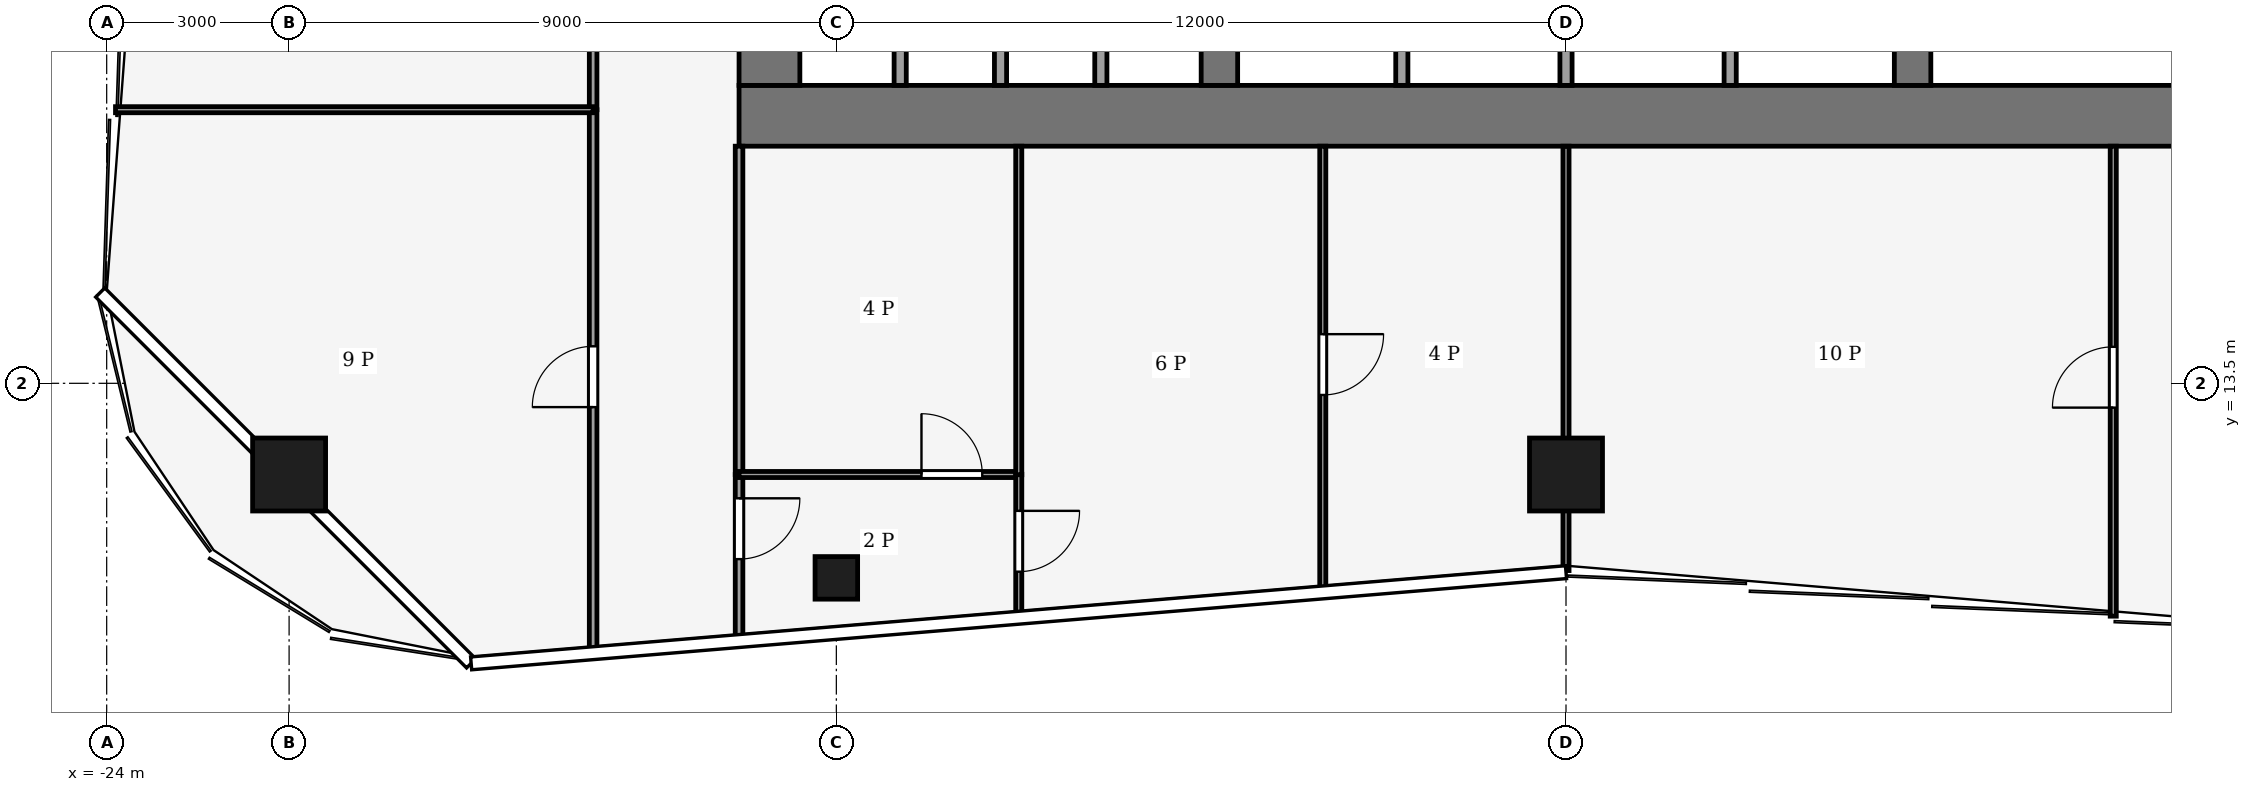
"""IFC4 building model, lengths in metres.
Left out: names, types, materials, properties, quantities, classifications, styles, units other than length and angle.
Written with IfcOpenShell. Run it as: python <this file> out.ifc"""

import sys

from ifc_helpers import new_model, si_unit, direction, frame, frame_2d, origin, origin_2d, place, context, subcontext, project, spatial, rectangle, hollow_rectangle, extrude, element, fill, save


model = new_model("IFC4")
c1 = context("Model", 3, precision=1e-05, world=origin(), true_north=direction((0.0, 1.0)))
c2 = subcontext(c1, "Body", "Model", "MODEL_VIEW")
j1 = project(units=[si_unit("LENGTHUNIT", "METRE"), si_unit("PLANEANGLEUNIT", "RADIAN")], contexts=[c1])
p1 = place(None, origin())
s1 = spatial("IfcSite", under=j1, at=p1, CompositionType="ELEMENT")
p2 = place(p1, origin())
s2 = spatial("IfcBuilding", under=s1, at=p2, CompositionType="ELEMENT")
p3 = place(p2, frame((0.0, 0.0, 146.0)))
s3 = spatial("IfcBuildingStorey", under=s2, at=p3, CompositionType="ELEMENT", Elevation=146.0)
p4 = place(p3, frame((-13.6, 17.9, -0.13), z_axis=(0.0, 0.0, 1.0), x_axis=(1.0, 0.0, 0.0)))
e1 = element("IfcWall", 1, at=p4, inside=s3, PredefinedType="SHEAR", context=c2, shape_type="SweptSolid", body=[
    extrude(rectangle(XDim=27.2, YDim=1.0, at=frame_2d((13.6, 0.0))), origin(), (0.0, 0.0, 1.0), 4.0),
])
p5 = place(p3, frame((-13.1, 18.4, -0.13), z_axis=(0.0, 0.0, 1.0), x_axis=(0.0, 1.0, 0.0)))
e2 = element("IfcWall", 2, at=p5, inside=s3, PredefinedType="SHEAR", context=c2, shape_type="SweptSolid", body=[
    extrude(rectangle(XDim=19.2, YDim=1.0, at=frame_2d((9.6, 0.0))), origin(), (0.0, 0.0, 1.0), 4.0),
])
p6 = place(p5, frame((2.8, 0.0, 0.13)))
e3 = element("IfcOpeningElement", 3, at=p6, cuts=e2, PredefinedType="OPENING", context=c2, shape_type="SweptSolid", body=[
    extrude(rectangle(XDim=2.4, YDim=2.4, at=frame_2d((1.2, 1.2))), frame((0.0, 0.51, 0.0), z_axis=(0.0, -1.0, 0.0), x_axis=(1.0, 0.0, 0.0)), (0.0, 0.0, 1.0), 1.02),
])
p7 = place(p5, frame((13.4, 0.0, 0.13)))
e4 = element("IfcOpeningElement", 4, at=p7, cuts=e2, PredefinedType="OPENING", context=c2, shape_type="SweptSolid", body=[
    extrude(rectangle(XDim=1.4, YDim=2.2, at=frame_2d((0.7, 1.1))), frame((0.0, 0.51, 0.0), z_axis=(0.0, -1.0, 0.0), x_axis=(1.0, 0.0, 0.0)), (0.0, 0.0, 1.0), 1.02),
])
p8 = place(p3, frame((-5.7, 18.4, -0.13), z_axis=(0.0, 0.0, 1.0), x_axis=(0.0, 1.0, 0.0)))
e5 = element("IfcWall", 5, at=p8, inside=s3, PredefinedType="SHEAR", context=c2, shape_type="SweptSolid", body=[
    extrude(rectangle(XDim=19.2, YDim=0.6, at=frame_2d((9.6, 0.0))), origin(), (0.0, 0.0, 1.0), 4.0),
])
p9 = place(p8, frame((8.35, 0.0, 0.13)))
e6 = element("IfcOpeningElement", 6, at=p9, cuts=e5, PredefinedType="OPENING", context=c2, shape_type="SweptSolid", body=[
    extrude(rectangle(XDim=0.9, YDim=2.1, at=frame_2d((0.45, 1.05))), frame((0.0, 0.31, 0.0), z_axis=(0.0, -1.0, 0.0), x_axis=(1.0, 0.0, 0.0)), (0.0, 0.0, 1.0), 0.62),
])
p10 = place(p3, frame((5.7, 18.4, -0.13), z_axis=(0.0, 0.0, 1.0), x_axis=(0.0, 1.0, 0.0)))
e7 = element("IfcWall", 7, at=p10, inside=s3, PredefinedType="SHEAR", context=c2, shape_type="SweptSolid", body=[
    extrude(rectangle(XDim=19.2, YDim=0.6, at=frame_2d((9.6, 0.0))), origin(), (0.0, 0.0, 1.0), 4.0),
])
p11 = place(p10, frame((8.35, 0.0, 0.13)))
e8 = element("IfcOpeningElement", 8, at=p11, cuts=e7, PredefinedType="OPENING", context=c2, shape_type="SweptSolid", body=[
    extrude(rectangle(XDim=0.9, YDim=2.1, at=frame_2d((0.45, 1.05))), frame((0.0, 0.31, 0.0), z_axis=(0.0, -1.0, 0.0), x_axis=(1.0, 0.0, 0.0)), (0.0, 0.0, 1.0), 0.62),
])
p12 = place(p10, frame((13.3, 0.0, 0.13)))
e9 = element("IfcOpeningElement", 9, at=p12, cuts=e7, PredefinedType="OPENING", context=c2, shape_type="SweptSolid", body=[
    extrude(rectangle(XDim=2.4, YDim=2.4, at=frame_2d((1.2, 1.2))), frame((0.0, 0.31, 0.0), z_axis=(0.0, -1.0, 0.0), x_axis=(1.0, 0.0, 0.0)), (0.0, 0.0, 1.0), 0.62),
])
for number, where, z_axis, x_axis in (
    (10, (0.0, 12.0, 0.0), (0.0, 0.0, 1.0), (1.0, 0.0, 0.0)),
    (11, (-21.0, 12.0, 0.0), (0.0, 0.0, 1.0), (1.0, 0.0, 0.0)),
):
    element("IfcColumn", number, at=place(p3, frame(where, z_axis=z_axis, x_axis=x_axis)), inside=s3, PredefinedType="COLUMN", context=c2, shape_type="SweptSolid", body=[
        extrude(hollow_rectangle(XDim=1.2, YDim=1.2, WallThickness=0.07, at=origin_2d()), origin(), (0.0, 0.0, 1.0), 4.0),
    ])
p13 = place(p3, frame((-12.0, 10.3, 0.0), z_axis=(0.0, 0.0, 1.0), x_axis=(1.0, 0.0, 0.0)))
e12 = element("IfcColumn", 12, at=p13, inside=s3, PredefinedType="COLUMN", context=c2, shape_type="SweptSolid", body=[
    extrude(hollow_rectangle(XDim=0.7, YDim=0.7, WallThickness=0.03, at=origin_2d()), origin(), (0.0, 0.0, 1.0), 4.0),
])
for number, where, z_axis, x_axis in (
    (13, (-10.95, 18.4, 0.0), (0.0, 0.0, 1.0), (0.0, 1.0, 0.0)),
    (14, (-9.3, 18.4, 0.0), (0.0, 0.0, 1.0), (0.0, 1.0, 0.0)),
    (15, (-7.65, 18.4, 0.0), (0.0, 0.0, 1.0), (0.0, 1.0, 0.0)),
    (16, (-2.7, 18.4, 0.0), (0.0, 0.0, 1.0), (0.0, 1.0, 0.0)),
    (17, (0.0, 18.4, 0.0), (0.0, 0.0, 1.0), (0.0, 1.0, 0.0)),
    (18, (2.7, 18.4, 0.0), (0.0, 0.0, 1.0), (0.0, 1.0, 0.0)),
):
    element("IfcWall", number, at=place(p3, frame(where, z_axis=z_axis, x_axis=x_axis)), inside=s3, PredefinedType="PARTITIONING", context=c2, shape_type="SweptSolid", body=[
        extrude(rectangle(XDim=2.4, YDim=0.2, at=frame_2d((1.2, 0.0))), origin(), (0.0, 0.0, 1.0), 3.87),
    ])
p14 = place(p3, frame((-16.0, 9.087, 0.0), z_axis=(0.0, 0.0, 1.0), x_axis=(0.0, 1.0, 0.0)))
e19 = element("IfcWall", 19, at=p14, inside=s3, PredefinedType="PARTITIONING", context=c2, shape_type="SweptSolid", body=[
    extrude(rectangle(XDim=8.913, YDim=0.125, at=frame_2d((4.457, 0.0))), origin(), (0.0, 0.0, 1.0), 3.04),
])
p15 = place(p14, frame((4.022, 0.0, 0.0)))
e20 = element("IfcOpeningElement", 20, at=p15, cuts=e19, PredefinedType="OPENING", context=c2, shape_type="SweptSolid", body=[
    extrude(rectangle(XDim=1.0, YDim=2.1, at=frame_2d((0.5, 1.05))), frame((0.0, 0.073, 0.0), z_axis=(0.0, -1.0, 0.0), x_axis=(1.0, 0.0, 0.0)), (0.0, 0.0, 1.0), 0.145),
])
p16 = place(p3, frame((-16.0, 33.0, 0.0), z_axis=(0.0, 0.0, 1.0), x_axis=(0.0, -1.0, 0.0)))
e21 = element("IfcWall", 21, at=p16, inside=s3, PredefinedType="PARTITIONING", context=c2, shape_type="SweptSolid", body=[
    extrude(rectangle(XDim=15.0, YDim=0.125, at=frame_2d((7.5, 0.0))), origin(), (0.0, 0.0, 1.0), 3.48),
])
p17 = place(p16, frame((6.6, 0.0, 0.0)))
e22 = element("IfcOpeningElement", 22, at=p17, cuts=e21, PredefinedType="OPENING", context=c2, shape_type="SweptSolid", body=[
    extrude(rectangle(XDim=1.8, YDim=2.1, at=frame_2d((0.9, 1.05))), frame((0.0, 0.073, 0.0), z_axis=(0.0, -1.0, 0.0), x_axis=(1.0, 0.0, 0.0)), (0.0, 0.0, 1.0), 0.145),
])
p18 = place(p3, frame((-13.6, 12.0, 0.0), z_axis=(0.0, 0.0, 1.0), x_axis=(0.0, -1.0, 0.0)))
e23 = element("IfcWall", 23, at=p18, inside=s3, PredefinedType="PARTITIONING", context=c2, shape_type="SweptSolid", body=[
    extrude(rectangle(XDim=2.713, YDim=0.125, at=frame_2d((1.357, 0.0))), origin(), (0.0, 0.0, 1.0), 3.04),
])
p19 = place(p18, frame((0.392, 0.0, 0.0)))
e24 = element("IfcOpeningElement", 24, at=p19, cuts=e23, PredefinedType="OPENING", context=c2, shape_type="SweptSolid", body=[
    extrude(rectangle(XDim=1.0, YDim=2.1, at=frame_2d((0.5, 1.05))), frame((0.0, 0.073, 0.0), z_axis=(0.0, -1.0, 0.0), x_axis=(1.0, 0.0, 0.0)), (0.0, 0.0, 1.0), 0.145),
])
p20 = place(p3, frame((-13.6, 12.0, 0.0), z_axis=(0.0, 0.0, 1.0), x_axis=(0.0, 1.0, 0.0)))
e25 = element("IfcWall", 25, at=p20, inside=s3, PredefinedType="PARTITIONING", context=c2, shape_type="SweptSolid", body=[
    extrude(rectangle(XDim=5.4, YDim=0.125, at=frame_2d((2.7, 0.0))), origin(), (0.0, 0.0, 1.0), 3.14),
])
p21 = place(p3, frame((-16.0, 18.0, 0.0), z_axis=(0.0, 0.0, 1.0), x_axis=(-1.0, 0.0, 0.0)))
e26 = element("IfcWall", 26, at=p21, inside=s3, PredefinedType="PARTITIONING", context=c2, shape_type="SweptSolid", body=[
    extrude(rectangle(XDim=7.855, YDim=0.1, at=frame_2d((3.927, 0.0))), origin(), (0.0, 0.0, 1.0), 3.04),
])
p22 = place(p3, frame((-13.6, 12.0, 0.0), z_axis=(0.0, 0.0, 1.0), x_axis=(1.0, 0.0, 0.0)))
e27 = element("IfcWall", 27, at=p22, inside=s3, PredefinedType="PARTITIONING", context=c2, shape_type="SweptSolid", body=[
    extrude(rectangle(XDim=4.6, YDim=0.1, at=frame_2d((2.3, 0.0))), origin(), (0.0, 0.0, 1.0), 3.87),
])
p23 = place(p22, frame((3.0, 0.0, 0.0)))
e28 = element("IfcOpeningElement", 28, at=p23, cuts=e27, PredefinedType="OPENING", context=c2, shape_type="SweptSolid", body=[
    extrude(rectangle(XDim=1.0, YDim=2.1, at=frame_2d((0.5, 1.05))), frame((0.0, 0.06, 0.0), z_axis=(0.0, -1.0, 0.0), x_axis=(1.0, 0.0, 0.0)), (0.0, 0.0, 1.0), 0.12),
])
p24 = place(p3, frame((-9.0, 12.004, 0.0), z_axis=(0.0, 0.0, 1.0), x_axis=(0.0, -1.0, 0.0)))
e29 = element("IfcWall", 29, at=p24, inside=s3, PredefinedType="PARTITIONING", context=c2, shape_type="SweptSolid", body=[
    extrude(rectangle(XDim=2.334, YDim=0.1, at=frame_2d((1.167, 0.0))), origin(), (0.0, 0.0, 1.0), 3.04),
])
p25 = place(p24, frame((0.602, 0.0, 0.0)))
e30 = element("IfcOpeningElement", 30, at=p25, cuts=e29, PredefinedType="OPENING", context=c2, shape_type="SweptSolid", body=[
    extrude(rectangle(XDim=1.0, YDim=2.1, at=frame_2d((0.5, 1.05))), frame((0.0, 0.06, 0.0), z_axis=(0.0, -1.0, 0.0), x_axis=(1.0, 0.0, 0.0)), (0.0, 0.0, 1.0), 0.12),
])
p26 = place(p3, frame((-9.0, 11.996, 0.0), z_axis=(0.0, 0.0, 1.0), x_axis=(0.0, 1.0, 0.0)))
e31 = element("IfcWall", 31, at=p26, inside=s3, PredefinedType="PARTITIONING", context=c2, shape_type="SweptSolid", body=[
    extrude(rectangle(XDim=5.404, YDim=0.1, at=frame_2d((2.702, 0.0))), origin(), (0.0, 0.0, 1.0), 3.87),
])
p27 = place(p3, frame((-4.0, 17.4, 0.0), z_axis=(0.0, 0.0, 1.0), x_axis=(0.0, -1.0, 0.0)))
e32 = element("IfcWall", 32, at=p27, inside=s3, PredefinedType="PARTITIONING", context=c2, shape_type="SweptSolid", body=[
    extrude(rectangle(XDim=7.313, YDim=0.1, at=frame_2d((3.657, 0.0))), origin(), (0.0, 0.0, 1.0), 3.04),
])
p28 = place(p27, frame((3.092, 0.0, 0.0)))
e33 = element("IfcOpeningElement", 33, at=p28, cuts=e32, PredefinedType="OPENING", context=c2, shape_type="SweptSolid", body=[
    extrude(rectangle(XDim=1.0, YDim=2.1, at=frame_2d((0.5, 1.05))), frame((0.0, 0.06, 0.0), z_axis=(0.0, -1.0, 0.0), x_axis=(1.0, 0.0, 0.0)), (0.0, 0.0, 1.0), 0.12),
])
p29 = place(p3, frame((0.0, 10.42, 0.0), z_axis=(0.0, 0.0, 1.0), x_axis=(0.0, 1.0, 0.0)))
e34 = element("IfcWall", 34, at=p29, inside=s3, PredefinedType="PARTITIONING", context=c2, shape_type="SweptSolid", body=[
    extrude(rectangle(XDim=6.98, YDim=0.1, at=frame_2d((3.49, 0.0))), origin(), (0.0, 0.0, 1.0), 3.04),
])
p30 = place(p3, frame((9.0, 9.67, 0.0), z_axis=(0.0, 0.0, 1.0), x_axis=(0.0, 1.0, 0.0)))
e35 = element("IfcWall", 35, at=p30, inside=s3, PredefinedType="PARTITIONING", context=c2, shape_type="SweptSolid", body=[
    extrude(rectangle(XDim=7.73, YDim=0.1, at=frame_2d((3.865, 0.0))), origin(), (0.0, 0.0, 1.0), 3.04),
])
p31 = place(p30, frame((3.43, 0.0, 0.0)))
e36 = element("IfcOpeningElement", 36, at=p31, cuts=e35, PredefinedType="OPENING", context=c2, shape_type="SweptSolid", body=[
    extrude(rectangle(XDim=1.0, YDim=2.1, at=frame_2d((0.5, 1.05))), frame((0.0, 0.06, 0.0), z_axis=(0.0, -1.0, 0.0), x_axis=(1.0, 0.0, 0.0)), (0.0, 0.0, 1.0), 0.12),
])
p32 = place(p15, origin())
e37 = element("IfcDoor", 37, at=p32, inside=s3, OperationType="SINGLE_SWING_RIGHT", PredefinedType="DOOR", context=c2, shape_type="SweptSolid", body=[
    extrude(rectangle(XDim=1.0, YDim=2.1, at=frame_2d((0.5, 1.05))), frame((0.0, 0.025, 0.0), z_axis=(0.0, -1.0, 0.0), x_axis=(1.0, 0.0, 0.0)), (0.0, 0.0, 1.0), 0.05),
])
fill(e20, e37)
p33 = place(p19, origin())
e38 = element("IfcDoor", 38, at=p33, inside=s3, OperationType="SINGLE_SWING_LEFT", PredefinedType="DOOR", context=c2, shape_type="SweptSolid", body=[
    extrude(rectangle(XDim=1.0, YDim=2.1, at=frame_2d((0.5, 1.05))), frame((0.0, 0.025, 0.0), z_axis=(0.0, -1.0, 0.0), x_axis=(1.0, 0.0, 0.0)), (0.0, 0.0, 1.0), 0.05),
])
fill(e24, e38)
p34 = place(p23, origin())
e39 = element("IfcDoor", 39, at=p34, inside=s3, OperationType="SINGLE_SWING_RIGHT", PredefinedType="DOOR", context=c2, shape_type="SweptSolid", body=[
    extrude(rectangle(XDim=1.0, YDim=2.1, at=frame_2d((0.5, 1.05))), frame((0.0, 0.025, 0.0), z_axis=(0.0, -1.0, 0.0), x_axis=(1.0, 0.0, 0.0)), (0.0, 0.0, 1.0), 0.05),
])
fill(e28, e39)
p35 = place(p25, origin())
e40 = element("IfcDoor", 40, at=p35, inside=s3, OperationType="SINGLE_SWING_LEFT", PredefinedType="DOOR", context=c2, shape_type="SweptSolid", body=[
    extrude(rectangle(XDim=1.0, YDim=2.1, at=frame_2d((0.5, 1.05))), frame((0.0, 0.025, 0.0), z_axis=(0.0, -1.0, 0.0), x_axis=(1.0, 0.0, 0.0)), (0.0, 0.0, 1.0), 0.05),
])
fill(e30, e40)
p36 = place(p28, origin())
e41 = element("IfcDoor", 41, at=p36, inside=s3, OperationType="SINGLE_SWING_LEFT", PredefinedType="DOOR", context=c2, shape_type="SweptSolid", body=[
    extrude(rectangle(XDim=1.0, YDim=2.1, at=frame_2d((0.5, 1.05))), frame((0.0, 0.025, 0.0), z_axis=(0.0, -1.0, 0.0), x_axis=(1.0, 0.0, 0.0)), (0.0, 0.0, 1.0), 0.05),
])
fill(e33, e41)
p37 = place(p31, origin())
e42 = element("IfcDoor", 42, at=p37, inside=s3, OperationType="SINGLE_SWING_RIGHT", PredefinedType="DOOR", context=c2, shape_type="SweptSolid", body=[
    extrude(rectangle(XDim=1.0, YDim=2.1, at=frame_2d((0.5, 1.05))), frame((0.0, 0.025, 0.0), z_axis=(0.0, -1.0, 0.0), x_axis=(1.0, 0.0, 0.0)), (0.0, 0.0, 1.0), 0.05),
])
fill(e36, e42)
save(model, sys.argv[1])
